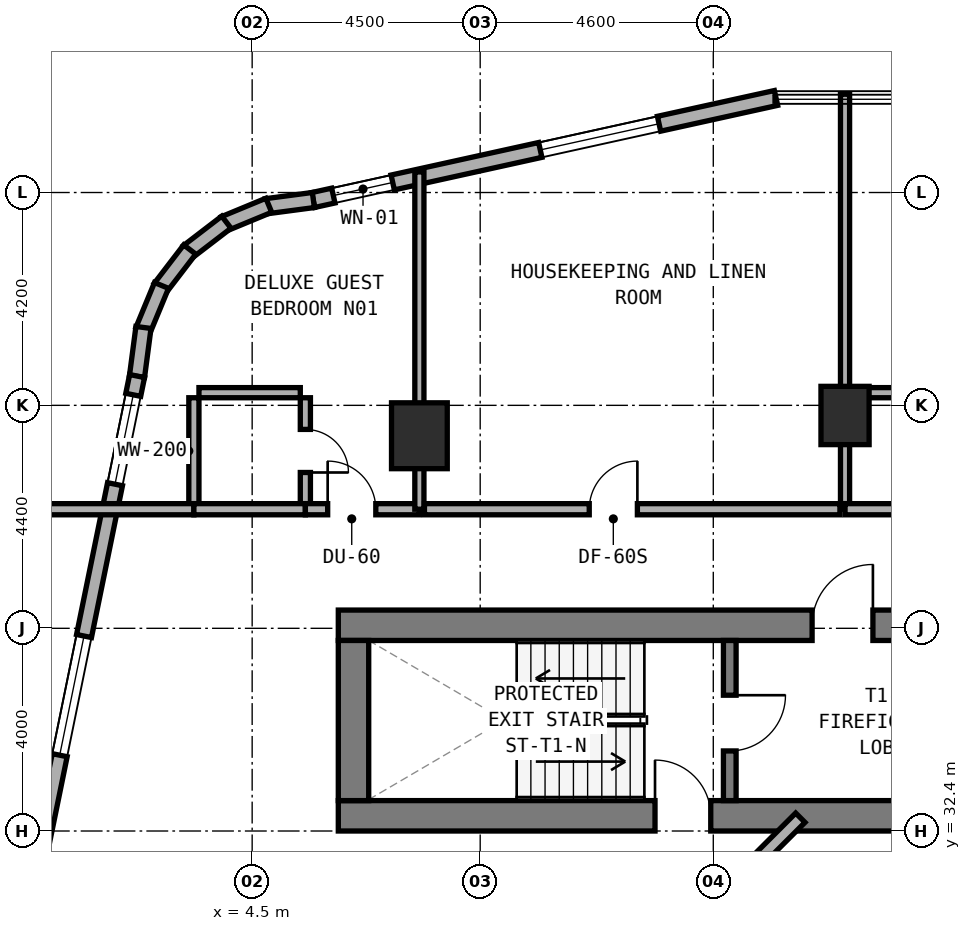
"""IFC4 building model, lengths in metres.
Left out: names, types, materials, properties, quantities, classifications, styles, units other than length and angle.
Written with IfcOpenShell. Run it as: python <this file> out.ifc"""

import sys

from ifc_helpers import new_model, si_unit, direction, frame, frame_2d, origin, origin_2d, place, context, subcontext, project, spatial, rectangle, extrude, element, fill, save


model = new_model("IFC4")
c1 = context("Model", 3, precision=1e-05, world=origin(), true_north=direction((0.0, 1.0)))
c2 = subcontext(c1, "Body", "Model", "MODEL_VIEW")
j1 = project(units=[si_unit("LENGTHUNIT", "METRE"), si_unit("PLANEANGLEUNIT", "RADIAN")], contexts=[c1])
p1 = place(None, origin())
s1 = spatial("IfcSite", under=j1, at=p1, CompositionType="ELEMENT")
p2 = place(p1, origin())
s2 = spatial("IfcBuilding", under=s1, at=p2, CompositionType="ELEMENT")
p3 = place(p2, frame((0.0, 0.0, 38.0)))
s3 = spatial("IfcBuildingStorey", under=s2, at=p3, CompositionType="ELEMENT", Elevation=38.0)
p4 = place(p3, frame((6.2, 32.7, 0.0), z_axis=(0.0, 0.0, 1.0), x_axis=(1.0, 0.0, 0.0)))
e1 = element("IfcWall", 1, at=p4, inside=s3, PredefinedType="SHEAR", context=c2, shape_type="SweptSolid", body=[
    extrude(rectangle(XDim=24.8, YDim=0.6, at=frame_2d((12.4, 0.0))), origin(), (0.0, 0.0, 1.0), 3.5),
])
p5 = place(p4, frame((6.25, 0.0, 0.0)))
e2 = element("IfcOpeningElement", 2, at=p5, cuts=e1, PredefinedType="OPENING", context=c2, shape_type="SweptSolid", body=[
    extrude(rectangle(XDim=1.1, YDim=2.15, at=frame_2d((0.55, 1.075))), frame((0.0, 0.31, 0.0), z_axis=(0.0, -1.0, 0.0), x_axis=(1.0, 0.0, 0.0)), (0.0, 0.0, 1.0), 0.62),
])
p6 = place(p3, frame((6.2, 36.46, 0.0), z_axis=(0.0, 0.0, 1.0), x_axis=(1.0, 0.0, 0.0)))
e3 = element("IfcWall", 3, at=p6, inside=s3, PredefinedType="SHEAR", context=c2, shape_type="SweptSolid", body=[
    extrude(rectangle(XDim=24.8, YDim=0.6, at=frame_2d((12.4, 0.0))), origin(), (0.0, 0.0, 1.0), 3.5),
])
p7 = place(p6, frame((9.35, 0.0, 0.0)))
e4 = element("IfcOpeningElement", 4, at=p7, cuts=e3, PredefinedType="OPENING", context=c2, shape_type="SweptSolid", body=[
    extrude(rectangle(XDim=1.2, YDim=2.15, at=frame_2d((0.6, 1.075))), frame((0.0, 0.31, 0.0), z_axis=(0.0, -1.0, 0.0), x_axis=(1.0, 0.0, 0.0)), (0.0, 0.0, 1.0), 0.62),
])
p8 = place(p6, frame((17.14, 0.0, 0.0)))
e5 = element("IfcOpeningElement", 5, at=p8, cuts=e3, PredefinedType="OPENING", context=c2, shape_type="SweptSolid", body=[
    extrude(rectangle(XDim=0.85, YDim=2.1, at=frame_2d((0.425, 1.05))), frame((0.0, 0.31, 0.0), z_axis=(0.0, -1.0, 0.0), x_axis=(1.0, 0.0, 0.0)), (0.0, 0.0, 1.0), 0.62),
])
p9 = place(p6, frame((18.983, 0.0, 0.0)))
e6 = element("IfcOpeningElement", 6, at=p9, cuts=e3, PredefinedType="OPENING", context=c2, shape_type="SweptSolid", body=[
    extrude(rectangle(XDim=1.1, YDim=2.15, at=frame_2d((0.55, 1.075))), frame((0.0, 0.31, 0.0), z_axis=(0.0, -1.0, 0.0), x_axis=(1.0, 0.0, 0.0)), (0.0, 0.0, 1.0), 0.62),
])
p10 = place(p6, frame((20.85, 0.0, 0.0)))
e7 = element("IfcOpeningElement", 7, at=p10, cuts=e3, PredefinedType="OPENING", context=c2, shape_type="SweptSolid", body=[
    extrude(rectangle(XDim=1.1, YDim=2.15, at=frame_2d((0.55, 1.075))), frame((0.0, 0.31, 0.0), z_axis=(0.0, -1.0, 0.0), x_axis=(1.0, 0.0, 0.0)), (0.0, 0.0, 1.0), 0.62),
])
p11 = place(p6, frame((22.716, 0.0, 0.0)))
e8 = element("IfcOpeningElement", 8, at=p11, cuts=e3, PredefinedType="OPENING", context=c2, shape_type="SweptSolid", body=[
    extrude(rectangle(XDim=1.1, YDim=2.15, at=frame_2d((0.55, 1.075))), frame((0.0, 0.31, 0.0), z_axis=(0.0, -1.0, 0.0), x_axis=(1.0, 0.0, 0.0)), (0.0, 0.0, 1.0), 0.62),
])
p12 = place(p3, frame((6.5, 33.0, 0.0), z_axis=(0.0, 0.0, 1.0), x_axis=(0.0, 1.0, 0.0)))
e9 = element("IfcWall", 9, at=p12, inside=s3, PredefinedType="SHEAR", context=c2, shape_type="SweptSolid", body=[
    extrude(rectangle(XDim=3.16, YDim=0.6, at=frame_2d((1.58, 0.0))), origin(), (0.0, 0.0, 1.0), 3.5),
])
p13 = place(p3, frame((13.925, 33.0, 0.0), z_axis=(0.0, 0.0, 1.0), x_axis=(0.0, 1.0, 0.0)))
e10 = element("IfcWall", 10, at=p13, inside=s3, PredefinedType="STANDARD", context=c2, shape_type="SweptSolid", body=[
    extrude(rectangle(XDim=3.16, YDim=0.25, at=frame_2d((1.58, 0.0))), origin(), (0.0, 0.0, 1.0), 3.22),
])
p14 = place(p13, frame((0.98, 0.0, 0.0)))
e11 = element("IfcOpeningElement", 11, at=p14, cuts=e10, PredefinedType="OPENING", context=c2, shape_type="SweptSolid", body=[
    extrude(rectangle(XDim=1.1, YDim=2.15, at=frame_2d((0.55, 1.075))), frame((0.0, 0.135, 0.0), z_axis=(0.0, -1.0, 0.0), x_axis=(1.0, 0.0, 0.0)), (0.0, 0.0, 1.0), 0.27),
])
p15 = place(p3, frame((16.2, 40.6, 0.0), z_axis=(0.0, 0.0, 1.0), x_axis=(1.0, 0.0, 0.0)))
e12 = element("IfcColumn", 12, at=p15, inside=s3, PredefinedType="COLUMN", context=c2, shape_type="SweptSolid", body=[
    extrude(rectangle(XDim=0.95, YDim=1.15, at=origin_2d()), origin(), (0.0, 0.0, 1.0), 3.5),
])
p16 = place(p3, frame((7.8, 40.2, 0.0), z_axis=(0.0, 0.0, 1.0), x_axis=(1.0, 0.0, 0.0)))
e13 = element("IfcColumn", 13, at=p16, inside=s3, PredefinedType="COLUMN", context=c2, shape_type="SweptSolid", body=[
    extrude(rectangle(XDim=1.1, YDim=1.3, at=origin_2d()), origin(), (0.0, 0.0, 1.0), 3.5),
])
p17 = place(p3, frame((14.838, 46.866, 0.0), z_axis=(0.0, 0.0, 1.0), x_axis=(-0.9765437942, -0.215318875183, 0.0)))
e14 = element("IfcWall", 14, at=p17, inside=s3, PredefinedType="STANDARD", context=c2, shape_type="SweptSolid", body=[
    extrude(rectangle(XDim=9.353, YDim=0.3, at=frame_2d((4.677, 0.0))), origin(), (0.0, 0.0, 1.0), 3.22),
])
p18 = place(p17, frame((2.364, 0.0, 0.8)))
e15 = element("IfcOpeningElement", 15, at=p18, cuts=e14, PredefinedType="OPENING", context=c2, shape_type="SweptSolid", body=[
    extrude(rectangle(XDim=2.4, YDim=1.6, at=frame_2d((1.2, 0.8))), frame((0.0, 0.16, 0.0), z_axis=(0.0, -1.0, 0.0), x_axis=(1.0, 0.0, 0.0)), (0.0, 0.0, 1.0), 0.32),
])
p19 = place(p17, frame((7.746, 0.0, 0.85)))
e16 = element("IfcOpeningElement", 16, at=p19, cuts=e14, PredefinedType="OPENING", context=c2, shape_type="SweptSolid", body=[
    extrude(rectangle(XDim=1.2, YDim=1.5, at=frame_2d((0.6, 0.75))), frame((0.0, 0.16, 0.0), z_axis=(0.0, -1.0, 0.0), x_axis=(1.0, 0.0, 0.0)), (0.0, 0.0, 1.0), 0.32),
])
p20 = place(p3, frame((5.708, 44.852, 0.0), z_axis=(0.0, 0.0, 1.0), x_axis=(-0.991359246108, -0.131174864804, 0.0)))
e17 = element("IfcWall", 17, at=p20, inside=s3, PredefinedType="STANDARD", context=c2, shape_type="SweptSolid", body=[
    extrude(rectangle(XDim=0.938, YDim=0.3, at=frame_2d((0.469, 0.0))), origin(), (0.0, 0.0, 1.0), 3.22),
])
p21 = place(p3, frame((4.828, 44.748, 0.0), z_axis=(0.0, 0.0, 1.0), x_axis=(-0.923982547689, -0.382434636986, 0.0)))
e18 = element("IfcWall", 18, at=p21, inside=s3, PredefinedType="STANDARD", context=c2, shape_type="SweptSolid", body=[
    extrude(rectangle(XDim=0.954, YDim=0.3, at=frame_2d((0.477, 0.0))), origin(), (0.0, 0.0, 1.0), 3.22),
])
for number, where, z_axis, x_axis in (
    (19, (3.991, 44.414, 0.0), (0.0, 0.0, 1.0), (-0.794, -0.608, 0.0)),
    (20, (3.268, 43.875, 0.0), (0.0, 0.0, 1.0), (-0.608, -0.794, 0.0)),
):
    element("IfcWall", number, at=place(p3, frame(where, z_axis=z_axis, x_axis=x_axis)), inside=s3, PredefinedType="STANDARD", context=c2, shape_type="SweptSolid", body=[
        extrude(rectangle(XDim=0.955, YDim=0.3, at=frame_2d((0.478, 0.0))), origin(), (0.0, 0.0, 1.0), 3.22),
    ])
p22 = place(p3, frame((2.711, 43.166, 0.0), z_axis=(0.0, 0.0, 1.0), x_axis=(-0.382344263057, -0.924019948111, 0.0)))
e21 = element("IfcWall", 21, at=p22, inside=s3, PredefinedType="STANDARD", context=c2, shape_type="SweptSolid", body=[
    extrude(rectangle(XDim=0.955, YDim=0.3, at=frame_2d((0.477, 0.0))), origin(), (0.0, 0.0, 1.0), 3.22),
])
p23 = place(p3, frame((2.355, 42.337, 0.0), z_axis=(0.0, 0.0, 1.0), x_axis=(-0.130454512571, -0.991454295543, 0.0)))
e22 = element("IfcWall", 22, at=p23, inside=s3, PredefinedType="STANDARD", context=c2, shape_type="SweptSolid", body=[
    extrude(rectangle(XDim=0.973, YDim=0.3, at=frame_2d((0.487, 0.0))), origin(), (0.0, 0.0, 1.0), 3.22),
])
p24 = place(p3, frame((2.229, 41.378, 0.0), z_axis=(0.0, 0.0, 1.0), x_axis=(-0.199990901713, -0.979797754249, 0.0)))
e23 = element("IfcWall", 23, at=p24, inside=s3, PredefinedType="STANDARD", context=c2, shape_type="SweptSolid", body=[
    extrude(rectangle(XDim=10.065, YDim=0.3, at=frame_2d((5.033, 0.0))), origin(), (0.0, 0.0, 1.0), 3.22),
])
p25 = place(p24, frame((0.378, 0.0, 0.85)))
e24 = element("IfcOpeningElement", 24, at=p25, cuts=e23, PredefinedType="OPENING", context=c2, shape_type="SweptSolid", body=[
    extrude(rectangle(XDim=1.8, YDim=1.5, at=frame_2d((0.9, 0.75))), frame((0.0, 0.16, 0.0), z_axis=(0.0, -1.0, 0.0), x_axis=(1.0, 0.0, 0.0)), (0.0, 0.0, 1.0), 0.32),
])
p26 = place(p24, frame((5.236, 0.0, 0.8)))
e25 = element("IfcOpeningElement", 25, at=p26, cuts=e23, PredefinedType="OPENING", context=c2, shape_type="SweptSolid", body=[
    extrude(rectangle(XDim=2.4, YDim=1.6, at=frame_2d((1.2, 0.8))), frame((0.0, 0.16, 0.0), z_axis=(0.0, -1.0, 0.0), x_axis=(1.0, 0.0, 0.0)), (0.0, 0.0, 1.0), 0.32),
])
p27 = place(p3, frame((15.318, 32.662, 0.0), z_axis=(0.0, 0.0, 1.0), x_axis=(-0.707106781187, -0.707106781187, 0.0)))
e26 = element("IfcWall", 26, at=p27, inside=s3, PredefinedType="STANDARD", context=c2, shape_type="SweptSolid", body=[
    extrude(rectangle(XDim=2.594, YDim=0.26, at=frame_2d((1.297, 0.0))), origin(), (0.0, 0.0, 1.0), 3.22),
])
p28 = place(p3, frame((5.55, 38.85, 0.0), z_axis=(0.0, 0.0, 1.0), x_axis=(0.0, 1.0, 0.0)))
e27 = element("IfcWall", 27, at=p28, inside=s3, PredefinedType="PLUMBINGWALL", context=c2, shape_type="SweptSolid", body=[
    extrude(rectangle(XDim=2.1, YDim=0.2, at=frame_2d((1.05, 0.0))), origin(), (0.0, 0.0, 1.0), 3.22),
])
p29 = place(p28, frame((0.625, 0.0, 0.0)))
e28 = element("IfcOpeningElement", 28, at=p29, cuts=e27, PredefinedType="OPENING", context=c2, shape_type="SweptSolid", body=[
    extrude(rectangle(XDim=0.85, YDim=2.1, at=frame_2d((0.425, 1.05))), frame((0.0, 0.11, 0.0), z_axis=(0.0, -1.0, 0.0), x_axis=(1.0, 0.0, 0.0)), (0.0, 0.0, 1.0), 0.22),
])
p30 = place(p3, frame((3.45, 41.05, 0.0), z_axis=(0.0, 0.0, 1.0), x_axis=(1.0, 0.0, 0.0)))
e29 = element("IfcWall", 29, at=p30, inside=s3, PredefinedType="PLUMBINGWALL", context=c2, shape_type="SweptSolid", body=[
    extrude(rectangle(XDim=2.0, YDim=0.2, at=frame_2d((1.0, 0.0))), origin(), (0.0, 0.0, 1.0), 3.22),
])
p31 = place(p3, frame((3.35, 38.85, 0.0), z_axis=(0.0, 0.0, 1.0), x_axis=(0.0, 1.0, 0.0)))
e30 = element("IfcWall", 30, at=p31, inside=s3, PredefinedType="PLUMBINGWALL", context=c2, shape_type="SweptSolid", body=[
    extrude(rectangle(XDim=2.1, YDim=0.2, at=frame_2d((1.05, 0.0))), origin(), (0.0, 0.0, 1.0), 3.22),
])
p32 = place(p3, frame((0.24, 38.75, 0.0), z_axis=(0.0, 0.0, 1.0), x_axis=(1.0, 0.0, 0.0)))
e31 = element("IfcWall", 31, at=p32, inside=s3, PredefinedType="SOLIDWALL", context=c2, shape_type="SweptSolid", body=[
    extrude(rectangle(XDim=3.11, YDim=0.22, at=frame_2d((1.555, 0.0))), origin(), (0.0, 0.0, 1.0), 3.22),
])
p33 = place(p3, frame((3.35, 38.75, 0.0), z_axis=(0.0, 0.0, 1.0), x_axis=(1.0, 0.0, 0.0)))
e32 = element("IfcWall", 32, at=p33, inside=s3, PredefinedType="SOLIDWALL", context=c2, shape_type="SweptSolid", body=[
    extrude(rectangle(XDim=2.2, YDim=0.22, at=frame_2d((1.1, 0.0))), origin(), (0.0, 0.0, 1.0), 3.22),
])
p34 = place(p3, frame((5.55, 38.75, 0.0), z_axis=(0.0, 0.0, 1.0), x_axis=(1.0, 0.0, 0.0)))
e33 = element("IfcWall", 33, at=p34, inside=s3, PredefinedType="SOLIDWALL", context=c2, shape_type="SweptSolid", body=[
    extrude(rectangle(XDim=2.25, YDim=0.22, at=frame_2d((1.125, 0.0))), origin(), (0.0, 0.0, 1.0), 2.395),
])
p35 = place(p34, frame((0.44, 0.0, 0.0)))
e34 = element("IfcOpeningElement", 34, at=p35, cuts=e33, PredefinedType="OPENING", context=c2, shape_type="SweptSolid", body=[
    extrude(rectangle(XDim=0.95, YDim=2.1, at=frame_2d((0.475, 1.05))), frame((0.0, 0.12, 0.0), z_axis=(0.0, -1.0, 0.0), x_axis=(1.0, 0.0, 0.0)), (0.0, 0.0, 1.0), 0.24),
])
p36 = place(p3, frame((7.8, 38.75, 0.0), z_axis=(0.0, 0.0, 1.0), x_axis=(0.0, 1.0, 0.0)))
e35 = element("IfcWall", 35, at=p36, inside=s3, PredefinedType="SOLIDWALL", context=c2, shape_type="SweptSolid", body=[
    extrude(rectangle(XDim=6.656, YDim=0.18, at=frame_2d((3.328, 0.0))), origin(), (0.0, 0.0, 1.0), 2.395),
])
p37 = place(p3, frame((7.9, 38.75, 0.0), z_axis=(0.0, 0.0, 1.0), x_axis=(1.0, 0.0, 0.0)))
e36 = element("IfcWall", 36, at=p37, inside=s3, PredefinedType="SOLIDWALL", context=c2, shape_type="SweptSolid", body=[
    extrude(rectangle(XDim=8.2, YDim=0.22, at=frame_2d((4.1, 0.0))), origin(), (0.0, 0.0, 1.0), 2.865),
])
p38 = place(p37, frame((3.252, 0.0, 0.0)))
e37 = element("IfcOpeningElement", 37, at=p38, cuts=e36, PredefinedType="OPENING", context=c2, shape_type="SweptSolid", body=[
    extrude(rectangle(XDim=0.95, YDim=2.1, at=frame_2d((0.475, 1.05))), frame((0.0, 0.12, 0.0), z_axis=(0.0, -1.0, 0.0), x_axis=(1.0, 0.0, 0.0)), (0.0, 0.0, 1.0), 0.24),
])
p39 = place(p3, frame((16.2, 38.75, 0.0), z_axis=(0.0, 0.0, 1.0), x_axis=(0.0, 1.0, 0.0)))
e38 = element("IfcWall", 38, at=p39, inside=s3, PredefinedType="SOLIDWALL", context=c2, shape_type="SweptSolid", body=[
    extrude(rectangle(XDim=8.19, YDim=0.18, at=frame_2d((4.095, 0.0))), origin(), (0.0, 0.0, 1.0), 2.395),
])
p40 = place(p3, frame((16.3, 41.05, 0.0), z_axis=(0.0, 0.0, 1.0), x_axis=(1.0, 0.0, 0.0)))
e39 = element("IfcWall", 39, at=p40, inside=s3, PredefinedType="PLUMBINGWALL", context=c2, shape_type="SweptSolid", body=[
    extrude(rectangle(XDim=2.0, YDim=0.2, at=frame_2d((1.0, 0.0))), origin(), (0.0, 0.0, 1.0), 3.22),
])
p41 = place(p3, frame((16.2, 38.75, 0.0), z_axis=(0.0, 0.0, 1.0), x_axis=(1.0, 0.0, 0.0)))
e40 = element("IfcWall", 40, at=p41, inside=s3, PredefinedType="SOLIDWALL", context=c2, shape_type="SweptSolid", body=[
    extrude(rectangle(XDim=2.2, YDim=0.22, at=frame_2d((1.1, 0.0))), origin(), (0.0, 0.0, 1.0), 2.395),
])
p42 = place(p18, origin())
e41 = element("IfcWindow", 41, at=p42, inside=s3, PartitioningType="SINGLE_PANEL", PredefinedType="WINDOW", context=c2, shape_type="SweptSolid", body=[
    extrude(rectangle(XDim=2.4, YDim=1.6, at=frame_2d((1.2, 0.8))), frame((0.0, 0.03, 0.0), z_axis=(0.0, -1.0, 0.0), x_axis=(1.0, 0.0, 0.0)), (0.0, 0.0, 1.0), 0.06),
])
fill(e15, e41)
p43 = place(p19, origin())
e42 = element("IfcWindow", 42, at=p43, inside=s3, PartitioningType="SINGLE_PANEL", PredefinedType="WINDOW", context=c2, shape_type="SweptSolid", body=[
    extrude(rectangle(XDim=1.2, YDim=1.5, at=frame_2d((0.6, 0.75))), frame((0.0, 0.03, 0.0), z_axis=(0.0, -1.0, 0.0), x_axis=(1.0, 0.0, 0.0)), (0.0, 0.0, 1.0), 0.06),
])
fill(e16, e42)
p44 = place(p25, origin())
e43 = element("IfcWindow", 43, at=p44, inside=s3, PartitioningType="SINGLE_PANEL", PredefinedType="WINDOW", context=c2, shape_type="SweptSolid", body=[
    extrude(rectangle(XDim=1.8, YDim=1.5, at=frame_2d((0.9, 0.75))), frame((0.0, 0.03, 0.0), z_axis=(0.0, -1.0, 0.0), x_axis=(1.0, 0.0, 0.0)), (0.0, 0.0, 1.0), 0.06),
])
fill(e24, e43)
p45 = place(p26, origin())
e44 = element("IfcWindow", 44, at=p45, inside=s3, PartitioningType="SINGLE_PANEL", PredefinedType="WINDOW", context=c2, shape_type="SweptSolid", body=[
    extrude(rectangle(XDim=2.4, YDim=1.6, at=frame_2d((1.2, 0.8))), frame((0.0, 0.03, 0.0), z_axis=(0.0, -1.0, 0.0), x_axis=(1.0, 0.0, 0.0)), (0.0, 0.0, 1.0), 0.06),
])
fill(e25, e44)
p46 = place(p14, frame((1.1, 0.0, 0.0), z_axis=(0.0, 0.0, 1.0), x_axis=(-1.0, 0.0, 0.0)))
e45 = element("IfcDoor", 45, at=p46, inside=s3, OperationType="SINGLE_SWING_LEFT", PredefinedType="DOOR", context=c2, shape_type="SweptSolid", body=[
    extrude(rectangle(XDim=1.1, YDim=2.15, at=frame_2d((0.55, 1.075))), frame((0.0, 0.025, 0.0), z_axis=(0.0, -1.0, 0.0), x_axis=(1.0, 0.0, 0.0)), (0.0, 0.0, 1.0), 0.05),
])
fill(e11, e45)
p47 = place(p7, origin())
e46 = element("IfcDoor", 46, at=p47, inside=s3, OperationType="SINGLE_SWING_RIGHT", PredefinedType="DOOR", context=c2, shape_type="SweptSolid", body=[
    extrude(rectangle(XDim=1.2, YDim=2.15, at=frame_2d((0.6, 1.075))), frame((0.0, 0.025, 0.0), z_axis=(0.0, -1.0, 0.0), x_axis=(1.0, 0.0, 0.0)), (0.0, 0.0, 1.0), 0.05),
])
fill(e4, e46)
p48 = place(p5, origin())
e47 = element("IfcDoor", 47, at=p48, inside=s3, OperationType="SINGLE_SWING_LEFT", PredefinedType="DOOR", context=c2, shape_type="SweptSolid", body=[
    extrude(rectangle(XDim=1.1, YDim=2.15, at=frame_2d((0.55, 1.075))), frame((0.0, 0.025, 0.0), z_axis=(0.0, -1.0, 0.0), x_axis=(1.0, 0.0, 0.0)), (0.0, 0.0, 1.0), 0.05),
])
fill(e2, e47)
p49 = place(p29, frame((0.85, 0.0, 0.0), z_axis=(0.0, 0.0, 1.0), x_axis=(-1.0, 0.0, 0.0)))
e48 = element("IfcDoor", 48, at=p49, inside=s3, OperationType="SINGLE_SWING_RIGHT", PredefinedType="DOOR", context=c2, shape_type="SweptSolid", body=[
    extrude(rectangle(XDim=0.85, YDim=2.1, at=frame_2d((0.425, 1.05))), frame((0.0, 0.025, 0.0), z_axis=(0.0, -1.0, 0.0), x_axis=(1.0, 0.0, 0.0)), (0.0, 0.0, 1.0), 0.05),
])
fill(e28, e48)
p50 = place(p35, origin())
e49 = element("IfcDoor", 49, at=p50, inside=s3, OperationType="SINGLE_SWING_LEFT", PredefinedType="DOOR", context=c2, shape_type="SweptSolid", body=[
    extrude(rectangle(XDim=0.95, YDim=2.1, at=frame_2d((0.475, 1.05))), frame((0.0, 0.025, 0.0), z_axis=(0.0, -1.0, 0.0), x_axis=(1.0, 0.0, 0.0)), (0.0, 0.0, 1.0), 0.05),
])
fill(e34, e49)
p51 = place(p38, origin())
e50 = element("IfcDoor", 50, at=p51, inside=s3, OperationType="SINGLE_SWING_RIGHT", PredefinedType="DOOR", context=c2, shape_type="SweptSolid", body=[
    extrude(rectangle(XDim=0.95, YDim=2.1, at=frame_2d((0.475, 1.05))), frame((0.0, 0.025, 0.0), z_axis=(0.0, -1.0, 0.0), x_axis=(1.0, 0.0, 0.0)), (0.0, 0.0, 1.0), 0.05),
])
fill(e37, e50)
save(model, sys.argv[1])
